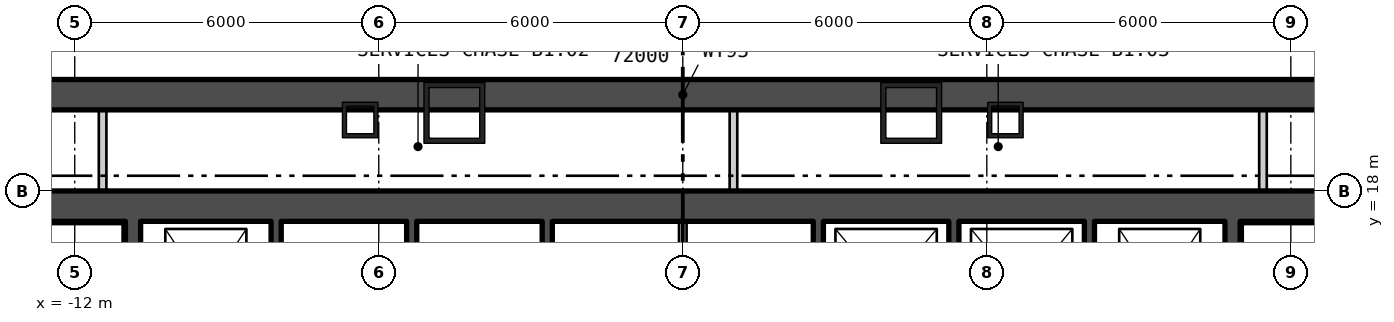
"""IFC4 building model, lengths in metres.
Left out: names, types, materials, properties, quantities, classifications, styles, units other than length and angle.
Written with IfcOpenShell. Run it as: python <this file> out.ifc"""

import sys

from ifc_helpers import new_model, si_unit, direction, frame, frame_2d, origin, origin_2d, place, context, subcontext, project, spatial, rectangle, hollow_rectangle, extrude, element, save


model = new_model("IFC4")
c1 = context("Model", 3, precision=1e-05, world=origin(), true_north=direction((0.0, 1.0)))
c2 = subcontext(c1, "Body", "Model", "MODEL_VIEW")
j1 = project(units=[si_unit("LENGTHUNIT", "METRE"), si_unit("PLANEANGLEUNIT", "RADIAN")], contexts=[c1])
p1 = place(None, origin())
s1 = spatial("IfcSite", under=j1, at=p1, CompositionType="ELEMENT")
p2 = place(p1, origin())
s2 = spatial("IfcBuilding", under=s1, at=p2, CompositionType="ELEMENT")
p3 = place(p2, frame((0.0, 0.0, -5.7)))
s3 = spatial("IfcBuildingStorey", under=s2, at=p3, CompositionType="ELEMENT", Elevation=-5.7)
for number, where, z_axis, x_axis in (
    (1, (4.508, 19.54, 0.0), (0.0, 0.0, 1.0), (-1.0, 0.0, 0.0)),
    (2, (-4.508, 19.54, 0.0), (0.0, 0.0, 1.0), (-1.0, 0.0, 0.0)),
):
    element("IfcColumn", number, at=place(p3, frame(where, z_axis=z_axis, x_axis=x_axis)), inside=s3, PredefinedType="COLUMN", context=c2, shape_type="SweptSolid", body=[
        extrude(hollow_rectangle(XDim=1.2, YDim=1.2, WallThickness=0.1, at=origin_2d()), origin(), (0.0, 0.0, 1.0), 5.7),
    ])
for number, where, z_axis, x_axis in (
    (3, (6.367, 19.4, 0.0), (0.0, 0.0, 1.0), (-1.0, 0.0, 0.0)),
    (4, (-6.367, 19.4, 0.0), (0.0, 0.0, 1.0), (-1.0, 0.0, 0.0)),
):
    element("IfcColumn", number, at=place(p3, frame(where, z_axis=z_axis, x_axis=x_axis)), inside=s3, PredefinedType="COLUMN", context=c2, shape_type="SweptSolid", body=[
        extrude(hollow_rectangle(XDim=0.7, YDim=0.7, WallThickness=0.08, at=origin_2d()), origin(), (0.0, 0.0, 1.0), 5.7),
    ])
p4 = place(p3, frame((-39.0, 19.9, -0.4), z_axis=(0.0, 0.0, 1.0), x_axis=(1.0, 0.0, 0.0)))
e5 = element("IfcWall", 5, at=p4, inside=s3, PredefinedType="STANDARD", context=c2, shape_type="SweptSolid", body=[
    extrude(rectangle(XDim=78.0, YDim=0.6, at=frame_2d((39.0, 0.0))), origin(), (0.0, 0.0, 1.0), 5.7),
])
p5 = place(p3, frame((-17.5, 17.7, 0.0), z_axis=(0.0, 0.0, 1.0), x_axis=(1.0, 0.0, 0.0)))
e6 = element("IfcWall", 6, at=p5, inside=s3, PredefinedType="SHEAR", context=c2, shape_type="SweptSolid", body=[
    extrude(rectangle(XDim=35.0, YDim=0.6, at=frame_2d((17.5, 0.0))), origin(), (0.0, 0.0, 1.0), 5.25),
])
p6 = place(p3, frame((-10.85, 0.6, 0.0), z_axis=(0.0, 0.0, 1.0), x_axis=(0.0, 1.0, 0.0)))
e7 = element("IfcWall", 7, at=p6, inside=s3, PredefinedType="SHEAR", context=c2, shape_type="SweptSolid", body=[
    extrude(rectangle(XDim=16.8, YDim=0.3, at=frame_2d((8.4, 0.0))), origin(), (0.0, 0.0, 1.0), 5.25),
])
p7 = place(p6, frame((5.075, 0.0, 0.0)))
e8 = element("IfcOpeningElement", 8, at=p7, cuts=e7, PredefinedType="OPENING", context=c2, shape_type="SweptSolid", body=[
    extrude(rectangle(XDim=1.25, YDim=2.1, at=frame_2d((0.625, 1.05))), frame((0.0, 0.16, 0.0), z_axis=(0.0, -1.0, 0.0), x_axis=(1.0, 0.0, 0.0)), (0.0, 0.0, 1.0), 0.32),
])
p8 = place(p6, frame((1.525, 0.0, 0.0)))
e9 = element("IfcOpeningElement", 9, at=p8, cuts=e7, PredefinedType="OPENING", context=c2, shape_type="SweptSolid", body=[
    extrude(rectangle(XDim=1.0, YDim=2.1, at=frame_2d((0.5, 1.05))), frame((0.0, 0.16, 0.0), z_axis=(0.0, -1.0, 0.0), x_axis=(1.0, 0.0, 0.0)), (0.0, 0.0, 1.0), 0.32),
])
p9 = place(p3, frame((10.85, 0.6, 0.0), z_axis=(0.0, 0.0, 1.0), x_axis=(0.0, 1.0, 0.0)))
e10 = element("IfcWall", 10, at=p9, inside=s3, PredefinedType="SHEAR", context=c2, shape_type="SweptSolid", body=[
    extrude(rectangle(XDim=16.8, YDim=0.3, at=frame_2d((8.4, 0.0))), origin(), (0.0, 0.0, 1.0), 5.25),
])
p10 = place(p9, frame((5.075, 0.0, 0.0)))
e11 = element("IfcOpeningElement", 11, at=p10, cuts=e10, PredefinedType="OPENING", context=c2, shape_type="SweptSolid", body=[
    extrude(rectangle(XDim=1.25, YDim=2.1, at=frame_2d((0.625, 1.05))), frame((0.0, 0.16, 0.0), z_axis=(0.0, -1.0, 0.0), x_axis=(1.0, 0.0, 0.0)), (0.0, 0.0, 1.0), 0.32),
])
p11 = place(p9, frame((1.525, 0.0, 0.0)))
e12 = element("IfcOpeningElement", 12, at=p11, cuts=e10, PredefinedType="OPENING", context=c2, shape_type="SweptSolid", body=[
    extrude(rectangle(XDim=1.0, YDim=2.1, at=frame_2d((0.5, 1.05))), frame((0.0, 0.16, 0.0), z_axis=(0.0, -1.0, 0.0), x_axis=(1.0, 0.0, 0.0)), (0.0, 0.0, 1.0), 0.32),
])
for number, where, z_axis, x_axis in (
    (13, (-8.025, 14.7, 0.0), (0.0, 0.0, 1.0), (0.0, 1.0, 0.0)),
    (14, (-5.35, 14.7, 0.0), (0.0, 0.0, 1.0), (0.0, 1.0, 0.0)),
    (15, (-2.675, 14.7, 0.0), (0.0, 0.0, 1.0), (0.0, 1.0, 0.0)),
):
    element("IfcWall", number, at=place(p3, frame(where, z_axis=z_axis, x_axis=x_axis)), inside=s3, PredefinedType="SHEAR", context=c2, shape_type="SweptSolid", body=[
        extrude(rectangle(XDim=2.7, YDim=0.2, at=frame_2d((1.35, 0.0))), origin(), (0.0, 0.0, 1.0), 5.25),
    ])
p12 = place(p3, frame((0.0, 14.7, 0.0), z_axis=(0.0, 0.0, 1.0), x_axis=(0.0, 1.0, 0.0)))
e16 = element("IfcWall", 16, at=p12, inside=s3, PredefinedType="PARTITIONING", context=c2, shape_type="SweptSolid", body=[
    extrude(rectangle(XDim=2.7, YDim=0.15, at=frame_2d((1.35, 0.0))), origin(), (0.0, 0.0, 1.0), 5.25),
])
for number, where, z_axis, x_axis in (
    (17, (2.675, 14.7, 0.0), (0.0, 0.0, 1.0), (0.0, 1.0, 0.0)),
    (18, (5.35, 14.7, 0.0), (0.0, 0.0, 1.0), (0.0, 1.0, 0.0)),
    (19, (8.025, 14.7, 0.0), (0.0, 0.0, 1.0), (0.0, 1.0, 0.0)),
):
    element("IfcWall", number, at=place(p3, frame(where, z_axis=z_axis, x_axis=x_axis)), inside=s3, PredefinedType="SHEAR", context=c2, shape_type="SweptSolid", body=[
        extrude(rectangle(XDim=2.7, YDim=0.2, at=frame_2d((1.35, 0.0))), origin(), (0.0, 0.0, 1.0), 5.25),
    ])
for number, where, z_axis, x_axis in (
    (20, (-11.45, 18.0, 0.0), (0.0, 0.0, 1.0), (0.0, 1.0, 0.0)),
    (21, (1.0, 18.0, 0.0), (0.0, 0.0, 1.0), (0.0, 1.0, 0.0)),
    (22, (11.45, 18.0, 0.0), (0.0, 0.0, 1.0), (0.0, 1.0, 0.0)),
):
    element("IfcWall", number, at=place(p3, frame(where, z_axis=z_axis, x_axis=x_axis)), inside=s3, PredefinedType="PARTITIONING", context=c2, shape_type="SweptSolid", body=[
        extrude(rectangle(XDim=1.75, YDim=0.15, at=frame_2d((0.875, 0.0))), origin(), (0.0, 0.0, 1.0), 5.25),
    ])
save(model, sys.argv[1])
